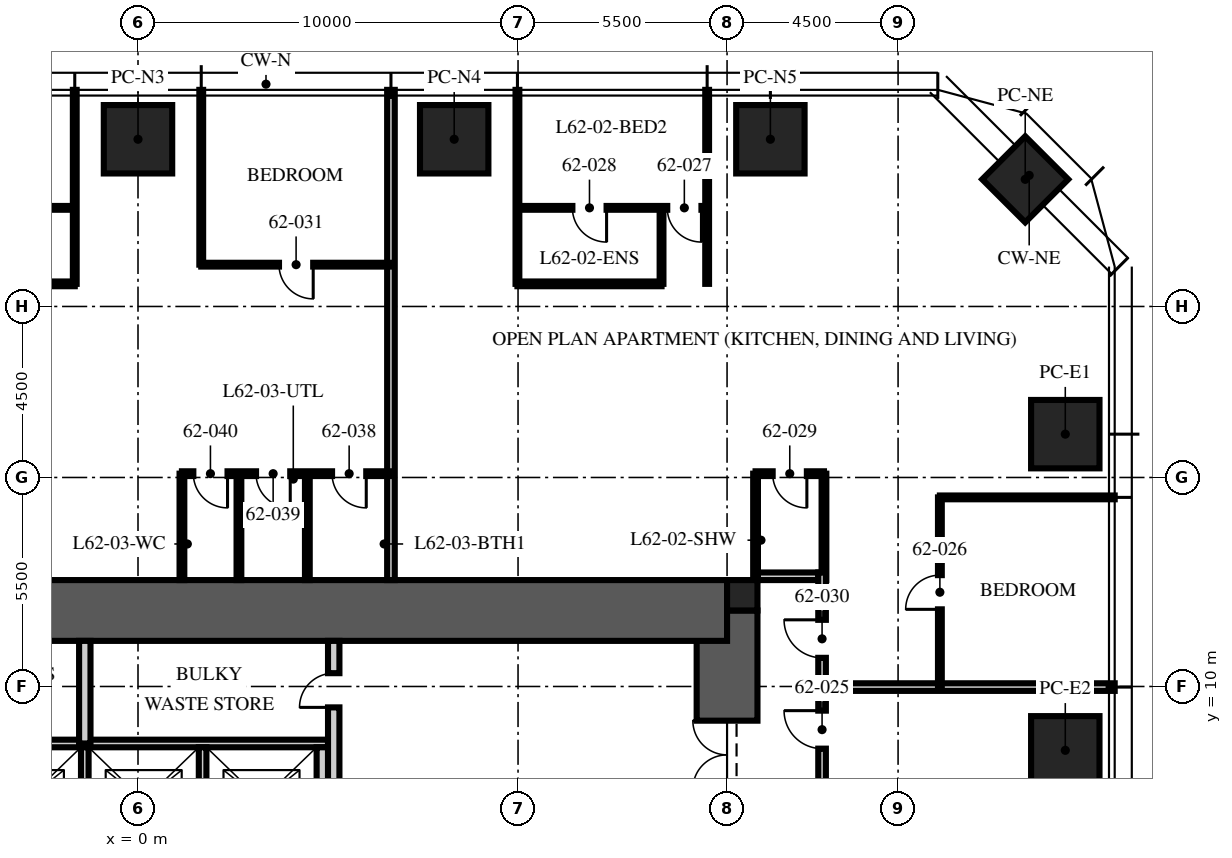
"""IFC4 building model, lengths in metres.
Left out: names, types, materials, properties, quantities, classifications, styles, units other than length and angle.
Written with IfcOpenShell. Run it as: python <this file> out.ifc"""

import sys

from ifc_helpers import new_model, si_unit, direction, frame, frame_2d, origin, origin_2d, place, context, subcontext, project, spatial, rectangle, extrude, element, fill, save


model = new_model("IFC4")
c1 = context("Model", 3, precision=1e-05, world=origin(), true_north=direction((0.0, 1.0)))
c2 = subcontext(c1, "Body", "Model", "MODEL_VIEW")
j1 = project(units=[si_unit("LENGTHUNIT", "METRE"), si_unit("PLANEANGLEUNIT", "RADIAN")], contexts=[c1])
p1 = place(None, origin())
s1 = spatial("IfcSite", under=j1, at=p1, CompositionType="ELEMENT")
p2 = place(p1, origin())
s2 = spatial("IfcBuilding", under=s1, at=p2, CompositionType="ELEMENT")
p3 = place(p2, frame((0.0, 0.0, 248.25)))
s3 = spatial("IfcBuildingStorey", under=s2, at=p3, CompositionType="ELEMENT", Elevation=248.25)
p4 = place(p3, frame((15.5, -12.0, -0.25), z_axis=(0.0, 0.0, 1.0), x_axis=(0.0, 1.0, 0.0)))
e1 = element("IfcWall", 1, at=p4, inside=s3, PredefinedType="SHEAR", context=c2, shape_type="SweptSolid", body=[
    extrude(rectangle(XDim=24.0, YDim=1.6, at=frame_2d((12.0, 0.0))), origin(), (0.0, 0.0, 1.0), 3.75),
])
p5 = place(p4, frame((3.2, 0.0, 0.25)))
e2 = element("IfcOpeningElement", 2, at=p5, cuts=e1, PredefinedType="OPENING", context=c2, shape_type="SweptSolid", body=[
    extrude(rectangle(XDim=1.2, YDim=2.1, at=frame_2d((0.6, 1.05))), frame((0.0, 0.81, 0.0), z_axis=(0.0, -1.0, 0.0), x_axis=(1.0, 0.0, 0.0)), (0.0, 0.0, 1.0), 1.62),
])
p6 = place(p4, frame((19.3, 0.0, 0.25)))
e3 = element("IfcOpeningElement", 3, at=p6, cuts=e1, PredefinedType="OPENING", context=c2, shape_type="SweptSolid", body=[
    extrude(rectangle(XDim=1.8, YDim=2.1, at=frame_2d((0.9, 1.05))), frame((0.0, 0.81, 0.0), z_axis=(0.0, -1.0, 0.0), x_axis=(1.0, 0.0, 0.0)), (0.0, 0.0, 1.0), 1.62),
])
p7 = place(p3, frame((-15.5, 12.0, -0.25), z_axis=(0.0, 0.0, 1.0), x_axis=(1.0, 0.0, 0.0)))
e4 = element("IfcWall", 4, at=p7, inside=s3, PredefinedType="SHEAR", context=c2, shape_type="SweptSolid", body=[
    extrude(rectangle(XDim=31.0, YDim=1.6, at=frame_2d((15.5, 0.0))), origin(), (0.0, 0.0, 1.0), 3.75),
])
p8 = place(p3, frame((15.9, 12.4, -0.25), z_axis=(0.0, 0.0, 1.0), x_axis=(1.0, 0.0, 0.0)))
e5 = element("IfcColumn", 5, at=p8, inside=s3, PredefinedType="COLUMN", context=c2, shape_type="SweptSolid", body=[
    extrude(rectangle(XDim=0.8, YDim=0.8, at=origin_2d()), origin(), (0.0, 0.0, 1.0), 3.75),
])
for number, where, z_axis, x_axis in (
    (6, (0.0, 24.4, 0.0), (0.0, 0.0, 1.0), (1.0, 0.0, 0.0)),
    (7, (8.32, 24.4, 0.0), (0.0, 0.0, 1.0), (1.0, 0.0, 0.0)),
    (8, (16.64, 24.4, 0.0), (0.0, 0.0, 1.0), (1.0, 0.0, 0.0)),
    (9, (24.4, 16.64, 0.0), (0.0, 0.0, 1.0), (0.0, 1.0, 0.0)),
    (10, (24.4, 8.32, 0.0), (0.0, 0.0, 1.0), (0.0, 1.0, 0.0)),
):
    element("IfcColumn", number, at=place(p3, frame(where, z_axis=z_axis, x_axis=x_axis)), inside=s3, PredefinedType="COLUMN", context=c2, shape_type="SweptSolid", body=[
        extrude(rectangle(XDim=1.8, YDim=1.8, at=origin_2d()), origin(), (0.0, 0.0, 1.0), 3.75),
    ])
p9 = place(p3, frame((23.346, 23.346, 0.0), z_axis=(0.0, 0.0, 1.0), x_axis=(0.707106781187, -0.707106781187, 0.0)))
e11 = element("IfcColumn", 11, at=p9, inside=s3, PredefinedType="COLUMN", context=c2, shape_type="SweptSolid", body=[
    extrude(rectangle(XDim=1.6, YDim=1.6, at=origin_2d()), origin(), (0.0, 0.0, 1.0), 3.75),
])
p10 = place(p3, frame((-4.7, 8.5, 0.0), z_axis=(0.0, 0.0, 1.0), x_axis=(1.0, 0.0, 0.0)))
e12 = element("IfcWall", 12, at=p10, inside=s3, PredefinedType="PARTITIONING", context=c2, shape_type="SweptSolid", body=[
    extrude(rectangle(XDim=9.7, YDim=0.2, at=frame_2d((4.85, 0.0))), origin(), (0.0, 0.0, 1.0), 3.5),
])
p11 = place(p3, frame((4.85, 5.6, 0.0), z_axis=(0.0, 0.0, 1.0), x_axis=(0.0, 1.0, 0.0)))
e13 = element("IfcWall", 13, at=p11, inside=s3, PredefinedType="PARTITIONING", context=c2, shape_type="SweptSolid", body=[
    extrude(rectangle(XDim=2.8, YDim=0.3, at=frame_2d((1.4, 0.0))), origin(), (0.0, 0.0, 1.0), 3.5),
])
for number, where, z_axis, x_axis in (
    (14, (-1.4, 5.6, 0.0), (0.0, 0.0, 1.0), (0.0, 1.0, 0.0)),
    (15, (1.7, 5.6, 0.0), (0.0, 0.0, 1.0), (0.0, 1.0, 0.0)),
):
    element("IfcWall", number, at=place(p3, frame(where, z_axis=z_axis, x_axis=x_axis)), inside=s3, PredefinedType="PARTITIONING", context=c2, shape_type="SweptSolid", body=[
        extrude(rectangle(XDim=2.8, YDim=0.2, at=frame_2d((1.4, 0.0))), origin(), (0.0, 0.0, 1.0), 3.5),
    ])
p12 = place(p3, frame((5.15, 5.3, 0.0), z_axis=(0.0, 0.0, 1.0), x_axis=(0.0, 1.0, 0.0)))
e16 = element("IfcWall", 16, at=p12, inside=s3, PredefinedType="PARTITIONING", context=c2, shape_type="SweptSolid", body=[
    extrude(rectangle(XDim=5.9, YDim=0.3, at=frame_2d((2.95, 0.0))), origin(), (0.0, 0.0, 1.0), 3.5),
])
p13 = place(p12, frame((4.15, 0.0, 0.0)))
e17 = element("IfcOpeningElement", 17, at=p13, cuts=e16, PredefinedType="OPENING", context=c2, shape_type="SweptSolid", body=[
    extrude(rectangle(XDim=0.9, YDim=2.1, at=frame_2d((0.45, 1.05))), frame((0.0, 0.16, 0.0), z_axis=(0.0, -1.0, 0.0), x_axis=(1.0, 0.0, 0.0)), (0.0, 0.0, 1.0), 0.32),
])
p14 = place(p3, frame((-1.4, 8.5, 0.0), z_axis=(0.0, 0.0, 1.0), x_axis=(0.0, 1.0, 0.0)))
e18 = element("IfcWall", 18, at=p14, inside=s3, PredefinedType="PARTITIONING", context=c2, shape_type="SweptSolid", body=[
    extrude(rectangle(XDim=2.7, YDim=0.3, at=frame_2d((1.35, 0.0))), origin(), (0.0, 0.0, 1.0), 3.5),
])
p15 = place(p3, frame((16.3, 12.9, 0.0), z_axis=(0.0, 0.0, 1.0), x_axis=(1.0, 0.0, 0.0)))
e19 = element("IfcWall", 19, at=p15, inside=s3, PredefinedType="PARTITIONING", context=c2, shape_type="SweptSolid", body=[
    extrude(rectangle(XDim=1.6, YDim=0.2, at=frame_2d((0.8, 0.0))), origin(), (0.0, 0.0, 1.0), 2.3),
])
p16 = place(p3, frame((18.1, 9.984, 0.0), z_axis=(0.0, 0.0, 1.0), x_axis=(1.0, 0.0, 0.0)))
e20 = element("IfcWall", 20, at=p16, inside=s3, PredefinedType="PARTITIONING", context=c2, shape_type="SweptSolid", body=[
    extrude(rectangle(XDim=7.6, YDim=0.2, at=frame_2d((3.8, 0.0))), origin(), (0.0, 0.0, 1.0), 2.91),
])
p17 = place(p3, frame((21.1, 14.976, 0.0), z_axis=(0.0, 0.0, 1.0), x_axis=(1.0, 0.0, 0.0)))
e21 = element("IfcWall", 21, at=p17, inside=s3, PredefinedType="PARTITIONING", context=c2, shape_type="SweptSolid", body=[
    extrude(rectangle(XDim=4.6, YDim=0.1, at=frame_2d((2.3, 0.0))), origin(), (0.0, 0.0, 1.0), 2.91),
])
for number, where, z_axis, x_axis in (
    (22, (14.976, 20.595, 0.0), (0.0, 0.0, 1.0), (0.0, 1.0, 0.0)),
    (23, (9.984, 20.595, 0.0), (0.0, 0.0, 1.0), (0.0, 1.0, 0.0)),
):
    element("IfcWall", number, at=place(p3, frame(where, z_axis=z_axis, x_axis=x_axis)), inside=s3, PredefinedType="PARTITIONING", context=c2, shape_type="SweptSolid", body=[
        extrude(rectangle(XDim=5.105, YDim=0.1, at=frame_2d((2.552, 0.0))), origin(), (0.0, 0.0, 1.0), 2.91),
    ])
p18 = place(p3, frame((6.656, 12.8, 0.0), z_axis=(0.0, 0.0, 1.0), x_axis=(0.0, 1.0, 0.0)))
e24 = element("IfcWall", 24, at=p18, inside=s3, PredefinedType="PARTITIONING", context=c2, shape_type="SweptSolid", body=[
    extrude(rectangle(XDim=12.9, YDim=0.2, at=frame_2d((6.45, 0.0))), origin(), (0.0, 0.0, 1.0), 2.91),
])
p19 = place(p3, frame((1.664, 21.1, 0.0), z_axis=(0.0, 0.0, 1.0), x_axis=(0.0, 1.0, 0.0)))
e25 = element("IfcWall", 25, at=p19, inside=s3, PredefinedType="PARTITIONING", context=c2, shape_type="SweptSolid", body=[
    extrude(rectangle(XDim=4.6, YDim=0.1, at=frame_2d((2.3, 0.0))), origin(), (0.0, 0.0, 1.0), 2.91),
])
p20 = place(p3, frame((-1.664, 20.595, 0.0), z_axis=(0.0, 0.0, 1.0), x_axis=(0.0, 1.0, 0.0)))
e26 = element("IfcWall", 26, at=p20, inside=s3, PredefinedType="PARTITIONING", context=c2, shape_type="SweptSolid", body=[
    extrude(rectangle(XDim=5.105, YDim=0.1, at=frame_2d((2.552, 0.0))), origin(), (0.0, 0.0, 1.0), 2.91),
])
p21 = place(p3, frame((21.1, 9.984, 0.0), z_axis=(0.0, 0.0, 1.0), x_axis=(0.0, 1.0, 0.0)))
e27 = element("IfcWall", 27, at=p21, inside=s3, PredefinedType="PARTITIONING", context=c2, shape_type="SweptSolid", body=[
    extrude(rectangle(XDim=4.992, YDim=0.1, at=frame_2d((2.496, 0.0))), origin(), (0.0, 0.0, 1.0), 2.81),
])
p22 = place(p21, frame((2.046, 0.0, 0.0)))
e28 = element("IfcOpeningElement", 28, at=p22, cuts=e27, PredefinedType="OPENING", context=c2, shape_type="SweptSolid", body=[
    extrude(rectangle(XDim=0.9, YDim=2.1, at=frame_2d((0.45, 1.05))), frame((0.0, 0.06, 0.0), z_axis=(0.0, -1.0, 0.0), x_axis=(1.0, 0.0, 0.0)), (0.0, 0.0, 1.0), 0.12),
])
p23 = place(p3, frame((14.976, 22.595, 0.0), z_axis=(0.0, 0.0, 1.0), x_axis=(-1.0, 0.0, 0.0)))
e29 = element("IfcWall", 29, at=p23, inside=s3, PredefinedType="PARTITIONING", context=c2, shape_type="SweptSolid", body=[
    extrude(rectangle(XDim=4.992, YDim=0.1, at=frame_2d((2.496, 0.0))), origin(), (0.0, 0.0, 1.0), 2.81),
])
p24 = place(p23, frame((0.15, 0.0, 0.0)))
e30 = element("IfcOpeningElement", 30, at=p24, cuts=e29, PredefinedType="OPENING", context=c2, shape_type="SweptSolid", body=[
    extrude(rectangle(XDim=0.9, YDim=2.1, at=frame_2d((0.45, 1.05))), frame((0.0, 0.06, 0.0), z_axis=(0.0, -1.0, 0.0), x_axis=(1.0, 0.0, 0.0)), (0.0, 0.0, 1.0), 0.12),
])
p25 = place(p23, frame((2.646, 0.0, 0.0)))
e31 = element("IfcOpeningElement", 31, at=p25, cuts=e29, PredefinedType="OPENING", context=c2, shape_type="SweptSolid", body=[
    extrude(rectangle(XDim=0.9, YDim=2.1, at=frame_2d((0.45, 1.05))), frame((0.0, 0.06, 0.0), z_axis=(0.0, -1.0, 0.0), x_axis=(1.0, 0.0, 0.0)), (0.0, 0.0, 1.0), 0.12),
])
p26 = place(p3, frame((13.776, 20.595, 0.0), z_axis=(0.0, 0.0, 1.0), x_axis=(0.0, 1.0, 0.0)))
e32 = element("IfcWall", 32, at=p26, inside=s3, PredefinedType="PARTITIONING", context=c2, shape_type="SweptSolid", body=[
    extrude(rectangle(XDim=2.0, YDim=0.1, at=frame_2d((1.0, 0.0))), origin(), (0.0, 0.0, 1.0), 3.5),
])
p27 = place(p3, frame((13.776, 20.595, 0.0), z_axis=(0.0, 0.0, 1.0), x_axis=(-1.0, 0.0, 0.0)))
e33 = element("IfcWall", 33, at=p27, inside=s3, PredefinedType="PARTITIONING", context=c2, shape_type="SweptSolid", body=[
    extrude(rectangle(XDim=3.792, YDim=0.125, at=frame_2d((1.896, 0.0))), origin(), (0.0, 0.0, 1.0), 2.81),
])
p28 = place(p3, frame((18.05, 15.6, 0.0), z_axis=(0.0, 0.0, 1.0), x_axis=(-1.0, 0.0, 0.0)))
e34 = element("IfcWall", 34, at=p28, inside=s3, PredefinedType="PARTITIONING", context=c2, shape_type="SweptSolid", body=[
    extrude(rectangle(XDim=1.8, YDim=0.125, at=frame_2d((0.9, 0.0))), origin(), (0.0, 0.0, 1.0), 2.3),
])
p29 = place(p28, frame((0.45, 0.0, 0.0)))
e35 = element("IfcOpeningElement", 35, at=p29, cuts=e34, PredefinedType="OPENING", context=c2, shape_type="SweptSolid", body=[
    extrude(rectangle(XDim=0.9, YDim=2.1, at=frame_2d((0.45, 1.05))), frame((0.0, 0.073, 0.0), z_axis=(0.0, -1.0, 0.0), x_axis=(1.0, 0.0, 0.0)), (0.0, 0.0, 1.0), 0.145),
])
for number, where, z_axis, x_axis in (
    (36, (18.05, 12.8, 0.0), (0.0, 0.0, 1.0), (0.0, 1.0, 0.0)),
    (37, (16.25, 12.8, 0.0), (0.0, 0.0, 1.0), (0.0, 1.0, 0.0)),
):
    element("IfcWall", number, at=place(p3, frame(where, z_axis=z_axis, x_axis=x_axis)), inside=s3, PredefinedType="PARTITIONING", context=c2, shape_type="SweptSolid", body=[
        extrude(rectangle(XDim=2.8, YDim=0.125, at=frame_2d((1.4, 0.0))), origin(), (0.0, 0.0, 1.0), 2.3),
    ])
p30 = place(p3, frame((6.656, 21.1, 0.0), z_axis=(0.0, 0.0, 1.0), x_axis=(-1.0, 0.0, 0.0)))
e38 = element("IfcWall", 38, at=p30, inside=s3, PredefinedType="PARTITIONING", context=c2, shape_type="SweptSolid", body=[
    extrude(rectangle(XDim=4.992, YDim=0.1, at=frame_2d((2.496, 0.0))), origin(), (0.0, 0.0, 1.0), 2.81),
])
p31 = place(p30, frame((2.046, 0.0, 0.0)))
e39 = element("IfcOpeningElement", 39, at=p31, cuts=e38, PredefinedType="OPENING", context=c2, shape_type="SweptSolid", body=[
    extrude(rectangle(XDim=0.9, YDim=2.1, at=frame_2d((0.45, 1.05))), frame((0.0, 0.06, 0.0), z_axis=(0.0, -1.0, 0.0), x_axis=(1.0, 0.0, 0.0)), (0.0, 0.0, 1.0), 0.12),
])
p32 = place(p3, frame((-1.664, 22.595, 0.0), z_axis=(0.0, 0.0, 1.0), x_axis=(-1.0, 0.0, 0.0)))
e40 = element("IfcWall", 40, at=p32, inside=s3, PredefinedType="PARTITIONING", context=c2, shape_type="SweptSolid", body=[
    extrude(rectangle(XDim=4.992, YDim=0.1, at=frame_2d((2.496, 0.0))), origin(), (0.0, 0.0, 1.0), 2.81),
])
p33 = place(p32, frame((3.942, 0.0, 0.0)))
e41 = element("IfcOpeningElement", 41, at=p33, cuts=e40, PredefinedType="OPENING", context=c2, shape_type="SweptSolid", body=[
    extrude(rectangle(XDim=0.9, YDim=2.1, at=frame_2d((0.45, 1.05))), frame((0.0, 0.06, 0.0), z_axis=(0.0, -1.0, 0.0), x_axis=(1.0, 0.0, 0.0)), (0.0, 0.0, 1.0), 0.12),
])
p34 = place(p32, frame((1.446, 0.0, 0.0)))
e42 = element("IfcOpeningElement", 42, at=p34, cuts=e40, PredefinedType="OPENING", context=c2, shape_type="SweptSolid", body=[
    extrude(rectangle(XDim=0.9, YDim=2.1, at=frame_2d((0.45, 1.05))), frame((0.0, 0.06, 0.0), z_axis=(0.0, -1.0, 0.0), x_axis=(1.0, 0.0, 0.0)), (0.0, 0.0, 1.0), 0.12),
])
p35 = place(p3, frame((-1.664, 20.595, 0.0), z_axis=(0.0, 0.0, 1.0), x_axis=(-1.0, 0.0, 0.0)))
e43 = element("IfcWall", 43, at=p35, inside=s3, PredefinedType="PARTITIONING", context=c2, shape_type="SweptSolid", body=[
    extrude(rectangle(XDim=3.792, YDim=0.125, at=frame_2d((1.896, 0.0))), origin(), (0.0, 0.0, 1.0), 2.81),
])
p36 = place(p3, frame((6.656, 15.6, 0.0), z_axis=(0.0, 0.0, 1.0), x_axis=(-1.0, 0.0, 0.0)))
e44 = element("IfcWall", 44, at=p36, inside=s3, PredefinedType="PARTITIONING", context=c2, shape_type="SweptSolid", body=[
    extrude(rectangle(XDim=5.5, YDim=0.125, at=frame_2d((2.75, 0.0))), origin(), (0.0, 0.0, 1.0), 2.81),
])
p37 = place(p36, frame((0.65, 0.0, 0.0)))
e45 = element("IfcOpeningElement", 45, at=p37, cuts=e44, PredefinedType="OPENING", context=c2, shape_type="SweptSolid", body=[
    extrude(rectangle(XDim=0.9, YDim=2.1, at=frame_2d((0.45, 1.05))), frame((0.0, 0.073, 0.0), z_axis=(0.0, -1.0, 0.0), x_axis=(1.0, 0.0, 0.0)), (0.0, 0.0, 1.0), 0.145),
])
p38 = place(p36, frame((2.65, 0.0, 0.0)))
e46 = element("IfcOpeningElement", 46, at=p38, cuts=e44, PredefinedType="OPENING", context=c2, shape_type="SweptSolid", body=[
    extrude(rectangle(XDim=0.9, YDim=2.1, at=frame_2d((0.45, 1.05))), frame((0.0, 0.073, 0.0), z_axis=(0.0, -1.0, 0.0), x_axis=(1.0, 0.0, 0.0)), (0.0, 0.0, 1.0), 0.145),
])
p39 = place(p36, frame((4.3, 0.0, 0.0)))
e47 = element("IfcOpeningElement", 47, at=p39, cuts=e44, PredefinedType="OPENING", context=c2, shape_type="SweptSolid", body=[
    extrude(rectangle(XDim=0.9, YDim=2.1, at=frame_2d((0.45, 1.05))), frame((0.0, 0.073, 0.0), z_axis=(0.0, -1.0, 0.0), x_axis=(1.0, 0.0, 0.0)), (0.0, 0.0, 1.0), 0.145),
])
for number, where, z_axis, x_axis in (
    (48, (4.456, 12.8, 0.0), (0.0, 0.0, 1.0), (0.0, 1.0, 0.0)),
    (49, (2.656, 12.8, 0.0), (0.0, 0.0, 1.0), (0.0, 1.0, 0.0)),
    (50, (1.156, 12.8, 0.0), (0.0, 0.0, 1.0), (0.0, 1.0, 0.0)),
):
    element("IfcWall", number, at=place(p3, frame(where, z_axis=z_axis, x_axis=x_axis)), inside=s3, PredefinedType="PARTITIONING", context=c2, shape_type="SweptSolid", body=[
        extrude(rectangle(XDim=2.8, YDim=0.125, at=frame_2d((1.4, 0.0))), origin(), (0.0, 0.0, 1.0), 3.5),
    ])
p40 = place(p3, frame((18.0, -13.0, 0.0), z_axis=(0.0, 0.0, 1.0), x_axis=(0.0, 1.0, 0.0)))
e51 = element("IfcWall", 51, at=p40, inside=s3, PredefinedType="PARTITIONING", context=c2, shape_type="SweptSolid", body=[
    extrude(rectangle(XDim=26.0, YDim=0.2, at=frame_2d((13.0, 0.0))), origin(), (0.0, 0.0, 1.0), 2.6),
])
p41 = place(p40, frame((21.364, 0.0, 0.0)))
e52 = element("IfcOpeningElement", 52, at=p41, cuts=e51, PredefinedType="OPENING", context=c2, shape_type="SweptSolid", body=[
    extrude(rectangle(XDim=1.0, YDim=2.2, at=frame_2d((0.5, 1.1))), frame((0.0, 0.11, 0.0), z_axis=(0.0, -1.0, 0.0), x_axis=(1.0, 0.0, 0.0)), (0.0, 0.0, 1.0), 0.22),
])
p42 = place(p40, frame((23.754, 0.0, 0.0)))
e53 = element("IfcOpeningElement", 53, at=p42, cuts=e51, PredefinedType="OPENING", context=c2, shape_type="SweptSolid", body=[
    extrude(rectangle(XDim=1.0, YDim=2.2, at=frame_2d((0.5, 1.1))), frame((0.0, 0.11, 0.0), z_axis=(0.0, -1.0, 0.0), x_axis=(1.0, 0.0, 0.0)), (0.0, 0.0, 1.0), 0.22),
])
p43 = place(p40, frame((4.6, 0.0, 0.0)))
e54 = element("IfcOpeningElement", 54, at=p43, cuts=e51, PredefinedType="OPENING", context=c2, shape_type="SweptSolid", body=[
    extrude(rectangle(XDim=1.0, YDim=2.2, at=frame_2d((0.5, 1.1))), frame((0.0, 0.11, 0.0), z_axis=(0.0, -1.0, 0.0), x_axis=(1.0, 0.0, 0.0)), (0.0, 0.0, 1.0), 0.22),
])
p44 = place(p6, origin())
e55 = element("IfcDoor", 55, at=p44, inside=s3, OperationType="DOUBLE_DOOR_SINGLE_SWING", PredefinedType="DOOR", context=c2, shape_type="SweptSolid", body=[
    extrude(rectangle(XDim=1.8, YDim=2.1, at=frame_2d((0.9, 1.05))), frame((0.0, 0.025, 0.0), z_axis=(0.0, -1.0, 0.0), x_axis=(1.0, 0.0, 0.0)), (0.0, 0.0, 1.0), 0.05),
])
fill(e3, e55)
p45 = place(p13, origin())
e56 = element("IfcDoor", 56, at=p45, inside=s3, OperationType="SINGLE_SWING_LEFT", PredefinedType="DOOR", context=c2, shape_type="SweptSolid", body=[
    extrude(rectangle(XDim=0.9, YDim=2.1, at=frame_2d((0.45, 1.05))), frame((0.0, 0.025, 0.0), z_axis=(0.0, -1.0, 0.0), x_axis=(1.0, 0.0, 0.0)), (0.0, 0.0, 1.0), 0.05),
])
fill(e17, e56)
p46 = place(p41, origin())
e57 = element("IfcDoor", 57, at=p46, inside=s3, OperationType="SINGLE_SWING_RIGHT", PredefinedType="DOOR", context=c2, shape_type="SweptSolid", body=[
    extrude(rectangle(XDim=1.0, YDim=2.2, at=frame_2d((0.5, 1.1))), frame((0.0, 0.025, 0.0), z_axis=(0.0, -1.0, 0.0), x_axis=(1.0, 0.0, 0.0)), (0.0, 0.0, 1.0), 0.05),
])
fill(e52, e57)
p47 = place(p22, origin())
e58 = element("IfcDoor", 58, at=p47, inside=s3, OperationType="SINGLE_SWING_LEFT", PredefinedType="DOOR", context=c2, shape_type="SweptSolid", body=[
    extrude(rectangle(XDim=0.9, YDim=2.1, at=frame_2d((0.45, 1.05))), frame((0.0, 0.025, 0.0), z_axis=(0.0, -1.0, 0.0), x_axis=(1.0, 0.0, 0.0)), (0.0, 0.0, 1.0), 0.05),
])
fill(e28, e58)
p48 = place(p24, origin())
e59 = element("IfcDoor", 59, at=p48, inside=s3, OperationType="SINGLE_SWING_LEFT", PredefinedType="DOOR", context=c2, shape_type="SweptSolid", body=[
    extrude(rectangle(XDim=0.9, YDim=2.1, at=frame_2d((0.45, 1.05))), frame((0.0, 0.025, 0.0), z_axis=(0.0, -1.0, 0.0), x_axis=(1.0, 0.0, 0.0)), (0.0, 0.0, 1.0), 0.05),
])
fill(e30, e59)
p49 = place(p25, origin())
e60 = element("IfcDoor", 60, at=p49, inside=s3, OperationType="SINGLE_SWING_LEFT", PredefinedType="DOOR", context=c2, shape_type="SweptSolid", body=[
    extrude(rectangle(XDim=0.9, YDim=2.1, at=frame_2d((0.45, 1.05))), frame((0.0, 0.025, 0.0), z_axis=(0.0, -1.0, 0.0), x_axis=(1.0, 0.0, 0.0)), (0.0, 0.0, 1.0), 0.05),
])
fill(e31, e60)
p50 = place(p29, origin())
e61 = element("IfcDoor", 61, at=p50, inside=s3, OperationType="SINGLE_SWING_LEFT", PredefinedType="DOOR", context=c2, shape_type="SweptSolid", body=[
    extrude(rectangle(XDim=0.9, YDim=2.1, at=frame_2d((0.45, 1.05))), frame((0.0, 0.025, 0.0), z_axis=(0.0, -1.0, 0.0), x_axis=(1.0, 0.0, 0.0)), (0.0, 0.0, 1.0), 0.05),
])
fill(e35, e61)
p51 = place(p42, origin())
e62 = element("IfcDoor", 62, at=p51, inside=s3, OperationType="SINGLE_SWING_RIGHT", PredefinedType="DOOR", context=c2, shape_type="SweptSolid", body=[
    extrude(rectangle(XDim=1.0, YDim=2.2, at=frame_2d((0.5, 1.1))), frame((0.0, 0.025, 0.0), z_axis=(0.0, -1.0, 0.0), x_axis=(1.0, 0.0, 0.0)), (0.0, 0.0, 1.0), 0.05),
])
fill(e53, e62)
p52 = place(p31, origin())
e63 = element("IfcDoor", 63, at=p52, inside=s3, OperationType="SINGLE_SWING_LEFT", PredefinedType="DOOR", context=c2, shape_type="SweptSolid", body=[
    extrude(rectangle(XDim=0.9, YDim=2.1, at=frame_2d((0.45, 1.05))), frame((0.0, 0.025, 0.0), z_axis=(0.0, -1.0, 0.0), x_axis=(1.0, 0.0, 0.0)), (0.0, 0.0, 1.0), 0.05),
])
fill(e39, e63)
p53 = place(p37, origin())
e64 = element("IfcDoor", 64, at=p53, inside=s3, OperationType="SINGLE_SWING_LEFT", PredefinedType="DOOR", context=c2, shape_type="SweptSolid", body=[
    extrude(rectangle(XDim=0.9, YDim=2.1, at=frame_2d((0.45, 1.05))), frame((0.0, 0.025, 0.0), z_axis=(0.0, -1.0, 0.0), x_axis=(1.0, 0.0, 0.0)), (0.0, 0.0, 1.0), 0.05),
])
fill(e45, e64)
p54 = place(p38, origin())
e65 = element("IfcDoor", 65, at=p54, inside=s3, OperationType="SINGLE_SWING_LEFT", PredefinedType="DOOR", context=c2, shape_type="SweptSolid", body=[
    extrude(rectangle(XDim=0.9, YDim=2.1, at=frame_2d((0.45, 1.05))), frame((0.0, 0.025, 0.0), z_axis=(0.0, -1.0, 0.0), x_axis=(1.0, 0.0, 0.0)), (0.0, 0.0, 1.0), 0.05),
])
fill(e46, e65)
p55 = place(p39, origin())
e66 = element("IfcDoor", 66, at=p55, inside=s3, OperationType="SINGLE_SWING_LEFT", PredefinedType="DOOR", context=c2, shape_type="SweptSolid", body=[
    extrude(rectangle(XDim=0.9, YDim=2.1, at=frame_2d((0.45, 1.05))), frame((0.0, 0.025, 0.0), z_axis=(0.0, -1.0, 0.0), x_axis=(1.0, 0.0, 0.0)), (0.0, 0.0, 1.0), 0.05),
])
fill(e47, e66)
save(model, sys.argv[1])
